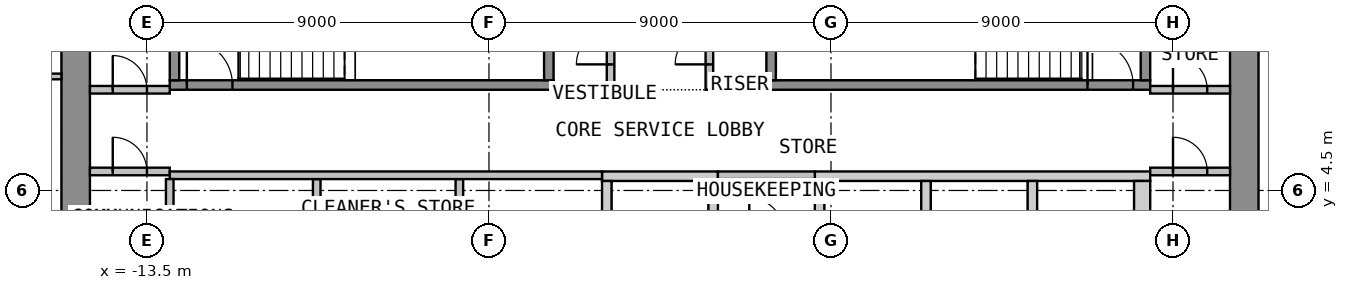
"""IFC4 building model, lengths in metres.
Left out: names, types, materials, properties, quantities, classifications, styles, units other than length and angle.
Written with IfcOpenShell. Run it as: python <this file> out.ifc"""

import sys

from ifc_helpers import new_model, si_unit, direction, frame, frame_2d, origin, place, context, subcontext, project, spatial, polyline, rectangle, outline, extrude, element, fill, save


model = new_model("IFC4")
c1 = context("Model", 3, precision=1e-05, world=origin(), true_north=direction((0.0, 1.0)))
c2 = subcontext(c1, "Body", "Model", "MODEL_VIEW")
j1 = project(units=[si_unit("LENGTHUNIT", "METRE"), si_unit("PLANEANGLEUNIT", "RADIAN")], contexts=[c1])
p1 = place(None, origin())
s1 = spatial("IfcSite", under=j1, at=p1, CompositionType="ELEMENT")
p2 = place(p1, origin())
s2 = spatial("IfcBuilding", under=s1, at=p2, CompositionType="ELEMENT")
p3 = place(p2, frame((0.0, 0.0, 144.3)))
s3 = spatial("IfcBuildingStorey", under=s2, at=p3, CompositionType="ELEMENT", Elevation=144.3)
p4 = place(p3, frame((-15.375, -12.75, 0.0), z_axis=(0.0, 0.0, 1.0), x_axis=(0.0, 1.0, 0.0)))
e1 = element("IfcWall", 1, at=p4, inside=s3, PredefinedType="SHEAR", context=c2, shape_type="SweptSolid", body=[
    extrude(rectangle(XDim=25.5, YDim=0.75, at=frame_2d((12.75, 0.0))), origin(), (0.0, 0.0, 1.0), 3.575),
])
p5 = place(p4, frame((11.55, 0.0, 0.0)))
e2 = element("IfcOpeningElement", 2, at=p5, cuts=e1, PredefinedType="OPENING", context=c2, shape_type="SweptSolid", body=[
    extrude(rectangle(XDim=2.4, YDim=2.1, at=frame_2d((1.2, 1.05))), frame((0.0, 0.385, 0.0), z_axis=(0.0, -1.0, 0.0), x_axis=(1.0, 0.0, 0.0)), (0.0, 0.0, 1.0), 0.77),
])
p6 = place(p3, frame((15.375, -12.75, 0.0), z_axis=(0.0, 0.0, 1.0), x_axis=(0.0, 1.0, 0.0)))
e3 = element("IfcWall", 3, at=p6, inside=s3, PredefinedType="SHEAR", context=c2, shape_type="SweptSolid", body=[
    extrude(rectangle(XDim=25.5, YDim=0.75, at=frame_2d((12.75, 0.0))), origin(), (0.0, 0.0, 1.0), 3.575),
])
p7 = place(p6, frame((11.55, 0.0, 0.0)))
e4 = element("IfcOpeningElement", 4, at=p7, cuts=e3, PredefinedType="OPENING", context=c2, shape_type="SweptSolid", body=[
    extrude(rectangle(XDim=2.4, YDim=2.1, at=frame_2d((1.2, 1.05))), frame((0.0, 0.385, 0.0), z_axis=(0.0, -1.0, 0.0), x_axis=(1.0, 0.0, 0.0)), (0.0, 0.0, 1.0), 0.77),
])
p8 = place(p3, origin())
e5 = element("IfcWall", 5, at=p8, inside=s3, PredefinedType="SHEAR", context=c2, shape_type="SweptSolid", body=[
    extrude(outline(polyline([(-1.525, 4.75), (1.525, 4.75), (1.525, 5.0), (-1.525, 5.0), (-1.525, 4.75)])), origin(), (0.0, 0.0, 1.0), 3.575),
])
p9 = place(p3, origin())
e6 = element("IfcWall", 6, at=p9, inside=s3, PredefinedType="SHEAR", context=c2, shape_type="SweptSolid", body=[
    extrude(outline(polyline([(4.075, 4.75), (12.9, 4.75), (12.9, 5.0), (4.075, 5.0), (4.075, 4.75)])), origin(), (0.0, 0.0, 1.0), 3.575),
])
p10 = place(p3, origin())
e7 = element("IfcWall", 7, at=p10, inside=s3, PredefinedType="SHEAR", context=c2, shape_type="SweptSolid", body=[
    extrude(outline(polyline([(-1.525, 2.05), (-1.275, 2.05), (-1.275, 4.75), (-1.525, 4.75), (-1.525, 2.05)])), origin(), (0.0, 0.0, 1.0), 3.575),
])
p11 = place(p3, origin())
e8 = element("IfcWall", 8, at=p11, inside=s3, PredefinedType="SHEAR", context=c2, shape_type="SweptSolid", body=[
    extrude(outline(polyline([(1.275, 2.05), (1.525, 2.05), (1.525, 4.75), (1.275, 4.75), (1.275, 2.05)])), origin(), (0.0, 0.0, 1.0), 3.575),
])
p12 = place(p3, origin())
e9 = element("IfcWall", 9, at=p12, inside=s3, PredefinedType="SHEAR", context=c2, shape_type="SweptSolid", body=[
    extrude(outline(polyline([(9.675, 2.05), (9.925, 2.05), (9.925, 4.75), (9.675, 4.75), (9.675, 2.05)])), origin(), (0.0, 0.0, 1.0), 3.575),
])
p13 = place(p3, origin())
e10 = element("IfcWall", 10, at=p13, inside=s3, PredefinedType="SHEAR", context=c2, shape_type="SweptSolid", body=[
    extrude(outline(polyline([(12.475, 2.05), (12.9, 2.05), (12.9, 4.75), (12.475, 4.75), (12.475, 2.05)])), origin(), (0.0, 0.0, 1.0), 3.575),
])
p14 = place(p3, origin())
e11 = element("IfcWall", 11, at=p14, inside=s3, PredefinedType="SHEAR", context=c2, shape_type="SweptSolid", body=[
    extrude(outline(polyline([(4.075, 3.05), (4.325, 3.05), (4.325, 4.75), (4.075, 4.75), (4.075, 3.05)])), origin(), (0.0, 0.0, 1.0), 3.575),
])
p15 = place(p3, origin())
e12 = element("IfcWall", 12, at=p15, inside=s3, PredefinedType="SHEAR", context=c2, shape_type="SweptSolid", body=[
    extrude(outline(polyline([(6.875, 3.05), (7.125, 3.05), (7.125, 4.75), (6.875, 4.75), (6.875, 3.05)])), origin(), (0.0, 0.0, 1.0), 3.575),
])
p16 = place(p3, frame((-12.9, 7.275, 0.0), z_axis=(0.0, 0.0, 1.0), x_axis=(1.0, 0.0, 0.0)))
e13 = element("IfcWall", 13, at=p16, inside=s3, PredefinedType="SHEAR", context=c2, shape_type="SweptSolid", body=[
    extrude(rectangle(XDim=10.1, YDim=0.25, at=frame_2d((5.05, 0.0))), origin(), (0.0, 0.0, 1.0), 3.575),
])
p17 = place(p16, frame((0.45, 0.0, 0.0)))
e14 = element("IfcOpeningElement", 14, at=p17, cuts=e13, PredefinedType="OPENING", context=c2, shape_type="SweptSolid", body=[
    extrude(rectangle(XDim=1.2, YDim=2.1, at=frame_2d((0.6, 1.05))), frame((0.0, 0.135, 0.0), z_axis=(0.0, -1.0, 0.0), x_axis=(1.0, 0.0, 0.0)), (0.0, 0.0, 1.0), 0.27),
])
for number, where, z_axis, x_axis in (
    (15, (-12.775, 7.4, 0.0), (0.0, 0.0, 1.0), (0.0, 1.0, 0.0)),
    (16, (-2.925, 7.4, 0.0), (0.0, 0.0, 1.0), (0.0, 1.0, 0.0)),
):
    element("IfcWall", number, at=place(p3, frame(where, z_axis=z_axis, x_axis=x_axis)), inside=s3, PredefinedType="SHEAR", context=c2, shape_type="SweptSolid", body=[
        extrude(rectangle(XDim=3.25, YDim=0.25, at=frame_2d((1.625, 0.0))), origin(), (0.0, 0.0, 1.0), 3.575),
    ])
p18 = place(p3, frame((2.8, 7.275, 0.0), z_axis=(0.0, 0.0, 1.0), x_axis=(1.0, 0.0, 0.0)))
e17 = element("IfcWall", 17, at=p18, inside=s3, PredefinedType="SHEAR", context=c2, shape_type="SweptSolid", body=[
    extrude(rectangle(XDim=10.1, YDim=0.25, at=frame_2d((5.05, 0.0))), origin(), (0.0, 0.0, 1.0), 3.575),
])
p19 = place(p18, frame((8.45, 0.0, 0.0)))
e18 = element("IfcOpeningElement", 18, at=p19, cuts=e17, PredefinedType="OPENING", context=c2, shape_type="SweptSolid", body=[
    extrude(rectangle(XDim=1.2, YDim=2.1, at=frame_2d((0.6, 1.05))), frame((0.0, 0.135, 0.0), z_axis=(0.0, -1.0, 0.0), x_axis=(1.0, 0.0, 0.0)), (0.0, 0.0, 1.0), 0.27),
])
for number, where, z_axis, x_axis in (
    (19, (2.925, 7.4, 0.0), (0.0, 0.0, 1.0), (0.0, 1.0, 0.0)),
    (20, (12.775, 7.4, 0.0), (0.0, 0.0, 1.0), (0.0, 1.0, 0.0)),
):
    element("IfcWall", number, at=place(p3, frame(where, z_axis=z_axis, x_axis=x_axis)), inside=s3, PredefinedType="SHEAR", context=c2, shape_type="SweptSolid", body=[
        extrude(rectangle(XDim=3.25, YDim=0.25, at=frame_2d((1.625, 0.0))), origin(), (0.0, 0.0, 1.0), 3.575),
    ])
for number, where, z_axis, x_axis in (
    (21, (-2.8, 7.25, 0.0), (0.0, 0.0, 1.0), (1.0, 0.0, 0.0)),
    (22, (1.4, 7.25, 0.0), (0.0, 0.0, 1.0), (1.0, 0.0, 0.0)),
):
    element("IfcWall", number, at=place(p3, frame(where, z_axis=z_axis, x_axis=x_axis)), inside=s3, PredefinedType="PARTITIONING", context=c2, shape_type="SweptSolid", body=[
        extrude(rectangle(XDim=1.4, YDim=0.2, at=frame_2d((0.7, 0.0))), origin(), (0.0, 0.0, 1.0), 3.575),
    ])
p20 = place(p3, frame((-1.3, 7.15, 0.0), z_axis=(0.0, 0.0, 1.0), x_axis=(0.0, 1.0, 0.0)))
e23 = element("IfcWall", 23, at=p20, inside=s3, PredefinedType="PARTITIONING", context=c2, shape_type="SweptSolid", body=[
    extrude(rectangle(XDim=5.6, YDim=0.2, at=frame_2d((2.8, 0.0))), origin(), (0.0, 0.0, 1.0), 3.575),
])
p21 = place(p20, frame((0.668, 0.0, 0.0)))
e24 = element("IfcOpeningElement", 24, at=p21, cuts=e23, PredefinedType="OPENING", context=c2, shape_type="SweptSolid", body=[
    extrude(rectangle(XDim=0.9, YDim=2.1, at=frame_2d((0.45, 1.05))), frame((0.0, 0.11, 0.0), z_axis=(0.0, -1.0, 0.0), x_axis=(1.0, 0.0, 0.0)), (0.0, 0.0, 1.0), 0.22),
])
p22 = place(p20, frame((2.477, 0.0, 0.0)))
e25 = element("IfcOpeningElement", 25, at=p22, cuts=e23, PredefinedType="OPENING", context=c2, shape_type="SweptSolid", body=[
    extrude(rectangle(XDim=0.9, YDim=2.1, at=frame_2d((0.45, 1.05))), frame((0.0, 0.11, 0.0), z_axis=(0.0, -1.0, 0.0), x_axis=(1.0, 0.0, 0.0)), (0.0, 0.0, 1.0), 0.22),
])
p23 = place(p20, frame((4.259, 0.0, 0.0)))
e26 = element("IfcOpeningElement", 26, at=p23, cuts=e23, PredefinedType="OPENING", context=c2, shape_type="SweptSolid", body=[
    extrude(rectangle(XDim=0.9, YDim=2.1, at=frame_2d((0.45, 1.05))), frame((0.0, 0.11, 0.0), z_axis=(0.0, -1.0, 0.0), x_axis=(1.0, 0.0, 0.0)), (0.0, 0.0, 1.0), 0.22),
])
p24 = place(p3, frame((1.3, 7.15, 0.0), z_axis=(0.0, 0.0, 1.0), x_axis=(0.0, 1.0, 0.0)))
e27 = element("IfcWall", 27, at=p24, inside=s3, PredefinedType="PARTITIONING", context=c2, shape_type="SweptSolid", body=[
    extrude(rectangle(XDim=5.6, YDim=0.2, at=frame_2d((2.8, 0.0))), origin(), (0.0, 0.0, 1.0), 3.575),
])
p25 = place(p24, frame((0.668, 0.0, 0.0)))
e28 = element("IfcOpeningElement", 28, at=p25, cuts=e27, PredefinedType="OPENING", context=c2, shape_type="SweptSolid", body=[
    extrude(rectangle(XDim=0.9, YDim=2.1, at=frame_2d((0.45, 1.05))), frame((0.0, 0.11, 0.0), z_axis=(0.0, -1.0, 0.0), x_axis=(1.0, 0.0, 0.0)), (0.0, 0.0, 1.0), 0.22),
])
p26 = place(p24, frame((2.477, 0.0, 0.0)))
e29 = element("IfcOpeningElement", 29, at=p26, cuts=e27, PredefinedType="OPENING", context=c2, shape_type="SweptSolid", body=[
    extrude(rectangle(XDim=0.9, YDim=2.1, at=frame_2d((0.45, 1.05))), frame((0.0, 0.11, 0.0), z_axis=(0.0, -1.0, 0.0), x_axis=(1.0, 0.0, 0.0)), (0.0, 0.0, 1.0), 0.22),
])
p27 = place(p24, frame((4.259, 0.0, 0.0)))
e30 = element("IfcOpeningElement", 30, at=p27, cuts=e27, PredefinedType="OPENING", context=c2, shape_type="SweptSolid", body=[
    extrude(rectangle(XDim=0.9, YDim=2.1, at=frame_2d((0.45, 1.05))), frame((0.0, 0.11, 0.0), z_axis=(0.0, -1.0, 0.0), x_axis=(1.0, 0.0, 0.0)), (0.0, 0.0, 1.0), 0.22),
])
p28 = place(p3, frame((-15.0, 7.15, 0.0), z_axis=(0.0, 0.0, 1.0), x_axis=(1.0, 0.0, 0.0)))
e31 = element("IfcWall", 31, at=p28, inside=s3, PredefinedType="PARTITIONING", context=c2, shape_type="SweptSolid", body=[
    extrude(rectangle(XDim=2.1, YDim=0.2, at=frame_2d((1.05, 0.0))), origin(), (0.0, 0.0, 1.0), 3.575),
])
p29 = place(p28, frame((0.6, 0.0, 0.0)))
e32 = element("IfcOpeningElement", 32, at=p29, cuts=e31, PredefinedType="OPENING", context=c2, shape_type="SweptSolid", body=[
    extrude(rectangle(XDim=0.9, YDim=2.1, at=frame_2d((0.45, 1.05))), frame((0.0, 0.11, 0.0), z_axis=(0.0, -1.0, 0.0), x_axis=(1.0, 0.0, 0.0)), (0.0, 0.0, 1.0), 0.22),
])
p30 = place(p3, frame((-15.0, 5.0, 0.0), z_axis=(0.0, 0.0, 1.0), x_axis=(1.0, 0.0, 0.0)))
e33 = element("IfcWall", 33, at=p30, inside=s3, PredefinedType="PARTITIONING", context=c2, shape_type="SweptSolid", body=[
    extrude(rectangle(XDim=2.1, YDim=0.2, at=frame_2d((1.05, 0.0))), origin(), (0.0, 0.0, 1.0), 3.575),
])
p31 = place(p30, frame((0.6, 0.0, 0.0)))
e34 = element("IfcOpeningElement", 34, at=p31, cuts=e33, PredefinedType="OPENING", context=c2, shape_type="SweptSolid", body=[
    extrude(rectangle(XDim=0.9, YDim=2.1, at=frame_2d((0.45, 1.05))), frame((0.0, 0.11, 0.0), z_axis=(0.0, -1.0, 0.0), x_axis=(1.0, 0.0, 0.0)), (0.0, 0.0, 1.0), 0.22),
])
p32 = place(p3, frame((12.9, 7.15, 0.0), z_axis=(0.0, 0.0, 1.0), x_axis=(1.0, 0.0, 0.0)))
e35 = element("IfcWall", 35, at=p32, inside=s3, PredefinedType="PARTITIONING", context=c2, shape_type="SweptSolid", body=[
    extrude(rectangle(XDim=2.1, YDim=0.2, at=frame_2d((1.05, 0.0))), origin(), (0.0, 0.0, 1.0), 3.575),
])
p33 = place(p32, frame((0.6, 0.0, 0.0)))
e36 = element("IfcOpeningElement", 36, at=p33, cuts=e35, PredefinedType="OPENING", context=c2, shape_type="SweptSolid", body=[
    extrude(rectangle(XDim=0.9, YDim=2.1, at=frame_2d((0.45, 1.05))), frame((0.0, 0.11, 0.0), z_axis=(0.0, -1.0, 0.0), x_axis=(1.0, 0.0, 0.0)), (0.0, 0.0, 1.0), 0.22),
])
p34 = place(p3, frame((12.9, 5.0, 0.0), z_axis=(0.0, 0.0, 1.0), x_axis=(1.0, 0.0, 0.0)))
e37 = element("IfcWall", 37, at=p34, inside=s3, PredefinedType="PARTITIONING", context=c2, shape_type="SweptSolid", body=[
    extrude(rectangle(XDim=2.1, YDim=0.2, at=frame_2d((1.05, 0.0))), origin(), (0.0, 0.0, 1.0), 3.575),
])
p35 = place(p34, frame((0.6, 0.0, 0.0)))
e38 = element("IfcOpeningElement", 38, at=p35, cuts=e37, PredefinedType="OPENING", context=c2, shape_type="SweptSolid", body=[
    extrude(rectangle(XDim=0.9, YDim=2.1, at=frame_2d((0.45, 1.05))), frame((0.0, 0.11, 0.0), z_axis=(0.0, -1.0, 0.0), x_axis=(1.0, 0.0, 0.0)), (0.0, 0.0, 1.0), 0.22),
])
for number, where, z_axis, x_axis in (
    (39, (-9.032, 2.0, 0.0), (0.0, 0.0, 1.0), (0.0, 1.0, 0.0)),
    (40, (-5.279, 2.0, 0.0), (0.0, 0.0, 1.0), (0.0, 1.0, 0.0)),
):
    element("IfcWall", number, at=place(p3, frame(where, z_axis=z_axis, x_axis=x_axis)), inside=s3, PredefinedType="PARTITIONING", context=c2, shape_type="SweptSolid", body=[
        extrude(rectangle(XDim=2.8, YDim=0.2, at=frame_2d((1.4, 0.0))), origin(), (0.0, 0.0, 1.0), 3.575),
    ])
p36 = place(p3, frame((-12.9, 4.9, 0.0), z_axis=(0.0, 0.0, 1.0), x_axis=(1.0, 0.0, 0.0)))
e41 = element("IfcWall", 41, at=p36, inside=s3, PredefinedType="PARTITIONING", context=c2, shape_type="SweptSolid", body=[
    extrude(rectangle(XDim=11.375, YDim=0.2, at=frame_2d((5.688, 0.0))), origin(), (0.0, 0.0, 1.0), 3.575),
])
p37 = place(p3, frame((-12.9, 2.0, 0.0), z_axis=(0.0, 0.0, 1.0), x_axis=(0.0, 1.0, 0.0)))
e42 = element("IfcWall", 42, at=p37, inside=s3, PredefinedType="PARTITIONING", context=c2, shape_type="SweptSolid", body=[
    extrude(rectangle(XDim=2.8, YDim=0.2, at=frame_2d((1.4, 0.0))), origin(), (0.0, 0.0, 1.0), 3.575),
])
p38 = place(p3, frame((1.525, 4.9, 0.0), z_axis=(0.0, 0.0, 1.0), x_axis=(1.0, 0.0, 0.0)))
e43 = element("IfcWall", 43, at=p38, inside=s3, PredefinedType="PARTITIONING", context=c2, shape_type="SweptSolid", body=[
    extrude(rectangle(XDim=2.55, YDim=0.2, at=frame_2d((1.275, 0.0))), origin(), (0.0, 0.0, 1.0), 3.575),
])
p39 = place(p3, frame((-18.675, 7.5, 0.0), z_axis=(0.0, 0.0, 1.0), x_axis=(1.0, 0.0, 0.0)))
e44 = element("IfcWall", 44, at=p39, inside=s3, PredefinedType="PARTITIONING", context=c2, shape_type="SweptSolid", body=[
    extrude(rectangle(XDim=2.925, YDim=0.15, at=frame_2d((1.462, 0.0))), origin(), (0.0, 0.0, 1.0), 3.575),
])
p40 = place(p17, origin())
e45 = element("IfcDoor", 45, at=p40, inside=s3, OperationType="SINGLE_SWING_LEFT", PredefinedType="DOOR", context=c2, shape_type="SweptSolid", body=[
    extrude(rectangle(XDim=1.2, YDim=2.1, at=frame_2d((0.6, 1.05))), frame((0.0, 0.025, 0.0), z_axis=(0.0, -1.0, 0.0), x_axis=(1.0, 0.0, 0.0)), (0.0, 0.0, 1.0), 0.05),
])
fill(e14, e45)
p41 = place(p19, origin())
e46 = element("IfcDoor", 46, at=p41, inside=s3, OperationType="SINGLE_SWING_LEFT", PredefinedType="DOOR", context=c2, shape_type="SweptSolid", body=[
    extrude(rectangle(XDim=1.2, YDim=2.1, at=frame_2d((0.6, 1.05))), frame((0.0, 0.025, 0.0), z_axis=(0.0, -1.0, 0.0), x_axis=(1.0, 0.0, 0.0)), (0.0, 0.0, 1.0), 0.05),
])
fill(e18, e46)
p42 = place(p21, origin())
e47 = element("IfcDoor", 47, at=p42, inside=s3, OperationType="SINGLE_SWING_LEFT", PredefinedType="DOOR", context=c2, shape_type="SweptSolid", body=[
    extrude(rectangle(XDim=0.9, YDim=2.1, at=frame_2d((0.45, 1.05))), frame((0.0, 0.025, 0.0), z_axis=(0.0, -1.0, 0.0), x_axis=(1.0, 0.0, 0.0)), (0.0, 0.0, 1.0), 0.05),
])
fill(e24, e47)
p43 = place(p25, origin())
e48 = element("IfcDoor", 48, at=p43, inside=s3, OperationType="SINGLE_SWING_LEFT", PredefinedType="DOOR", context=c2, shape_type="SweptSolid", body=[
    extrude(rectangle(XDim=0.9, YDim=2.1, at=frame_2d((0.45, 1.05))), frame((0.0, 0.025, 0.0), z_axis=(0.0, -1.0, 0.0), x_axis=(1.0, 0.0, 0.0)), (0.0, 0.0, 1.0), 0.05),
])
fill(e28, e48)
p44 = place(p29, origin())
e49 = element("IfcDoor", 49, at=p44, inside=s3, OperationType="SINGLE_SWING_LEFT", PredefinedType="DOOR", context=c2, shape_type="SweptSolid", body=[
    extrude(rectangle(XDim=0.9, YDim=2.1, at=frame_2d((0.45, 1.05))), frame((0.0, 0.025, 0.0), z_axis=(0.0, -1.0, 0.0), x_axis=(1.0, 0.0, 0.0)), (0.0, 0.0, 1.0), 0.05),
])
fill(e32, e49)
p45 = place(p31, origin())
e50 = element("IfcDoor", 50, at=p45, inside=s3, OperationType="SINGLE_SWING_LEFT", PredefinedType="DOOR", context=c2, shape_type="SweptSolid", body=[
    extrude(rectangle(XDim=0.9, YDim=2.1, at=frame_2d((0.45, 1.05))), frame((0.0, 0.025, 0.0), z_axis=(0.0, -1.0, 0.0), x_axis=(1.0, 0.0, 0.0)), (0.0, 0.0, 1.0), 0.05),
])
fill(e34, e50)
p46 = place(p33, origin())
e51 = element("IfcDoor", 51, at=p46, inside=s3, OperationType="SINGLE_SWING_LEFT", PredefinedType="DOOR", context=c2, shape_type="SweptSolid", body=[
    extrude(rectangle(XDim=0.9, YDim=2.1, at=frame_2d((0.45, 1.05))), frame((0.0, 0.025, 0.0), z_axis=(0.0, -1.0, 0.0), x_axis=(1.0, 0.0, 0.0)), (0.0, 0.0, 1.0), 0.05),
])
fill(e36, e51)
p47 = place(p35, origin())
e52 = element("IfcDoor", 52, at=p47, inside=s3, OperationType="SINGLE_SWING_LEFT", PredefinedType="DOOR", context=c2, shape_type="SweptSolid", body=[
    extrude(rectangle(XDim=0.9, YDim=2.1, at=frame_2d((0.45, 1.05))), frame((0.0, 0.025, 0.0), z_axis=(0.0, -1.0, 0.0), x_axis=(1.0, 0.0, 0.0)), (0.0, 0.0, 1.0), 0.05),
])
fill(e38, e52)
save(model, sys.argv[1])
